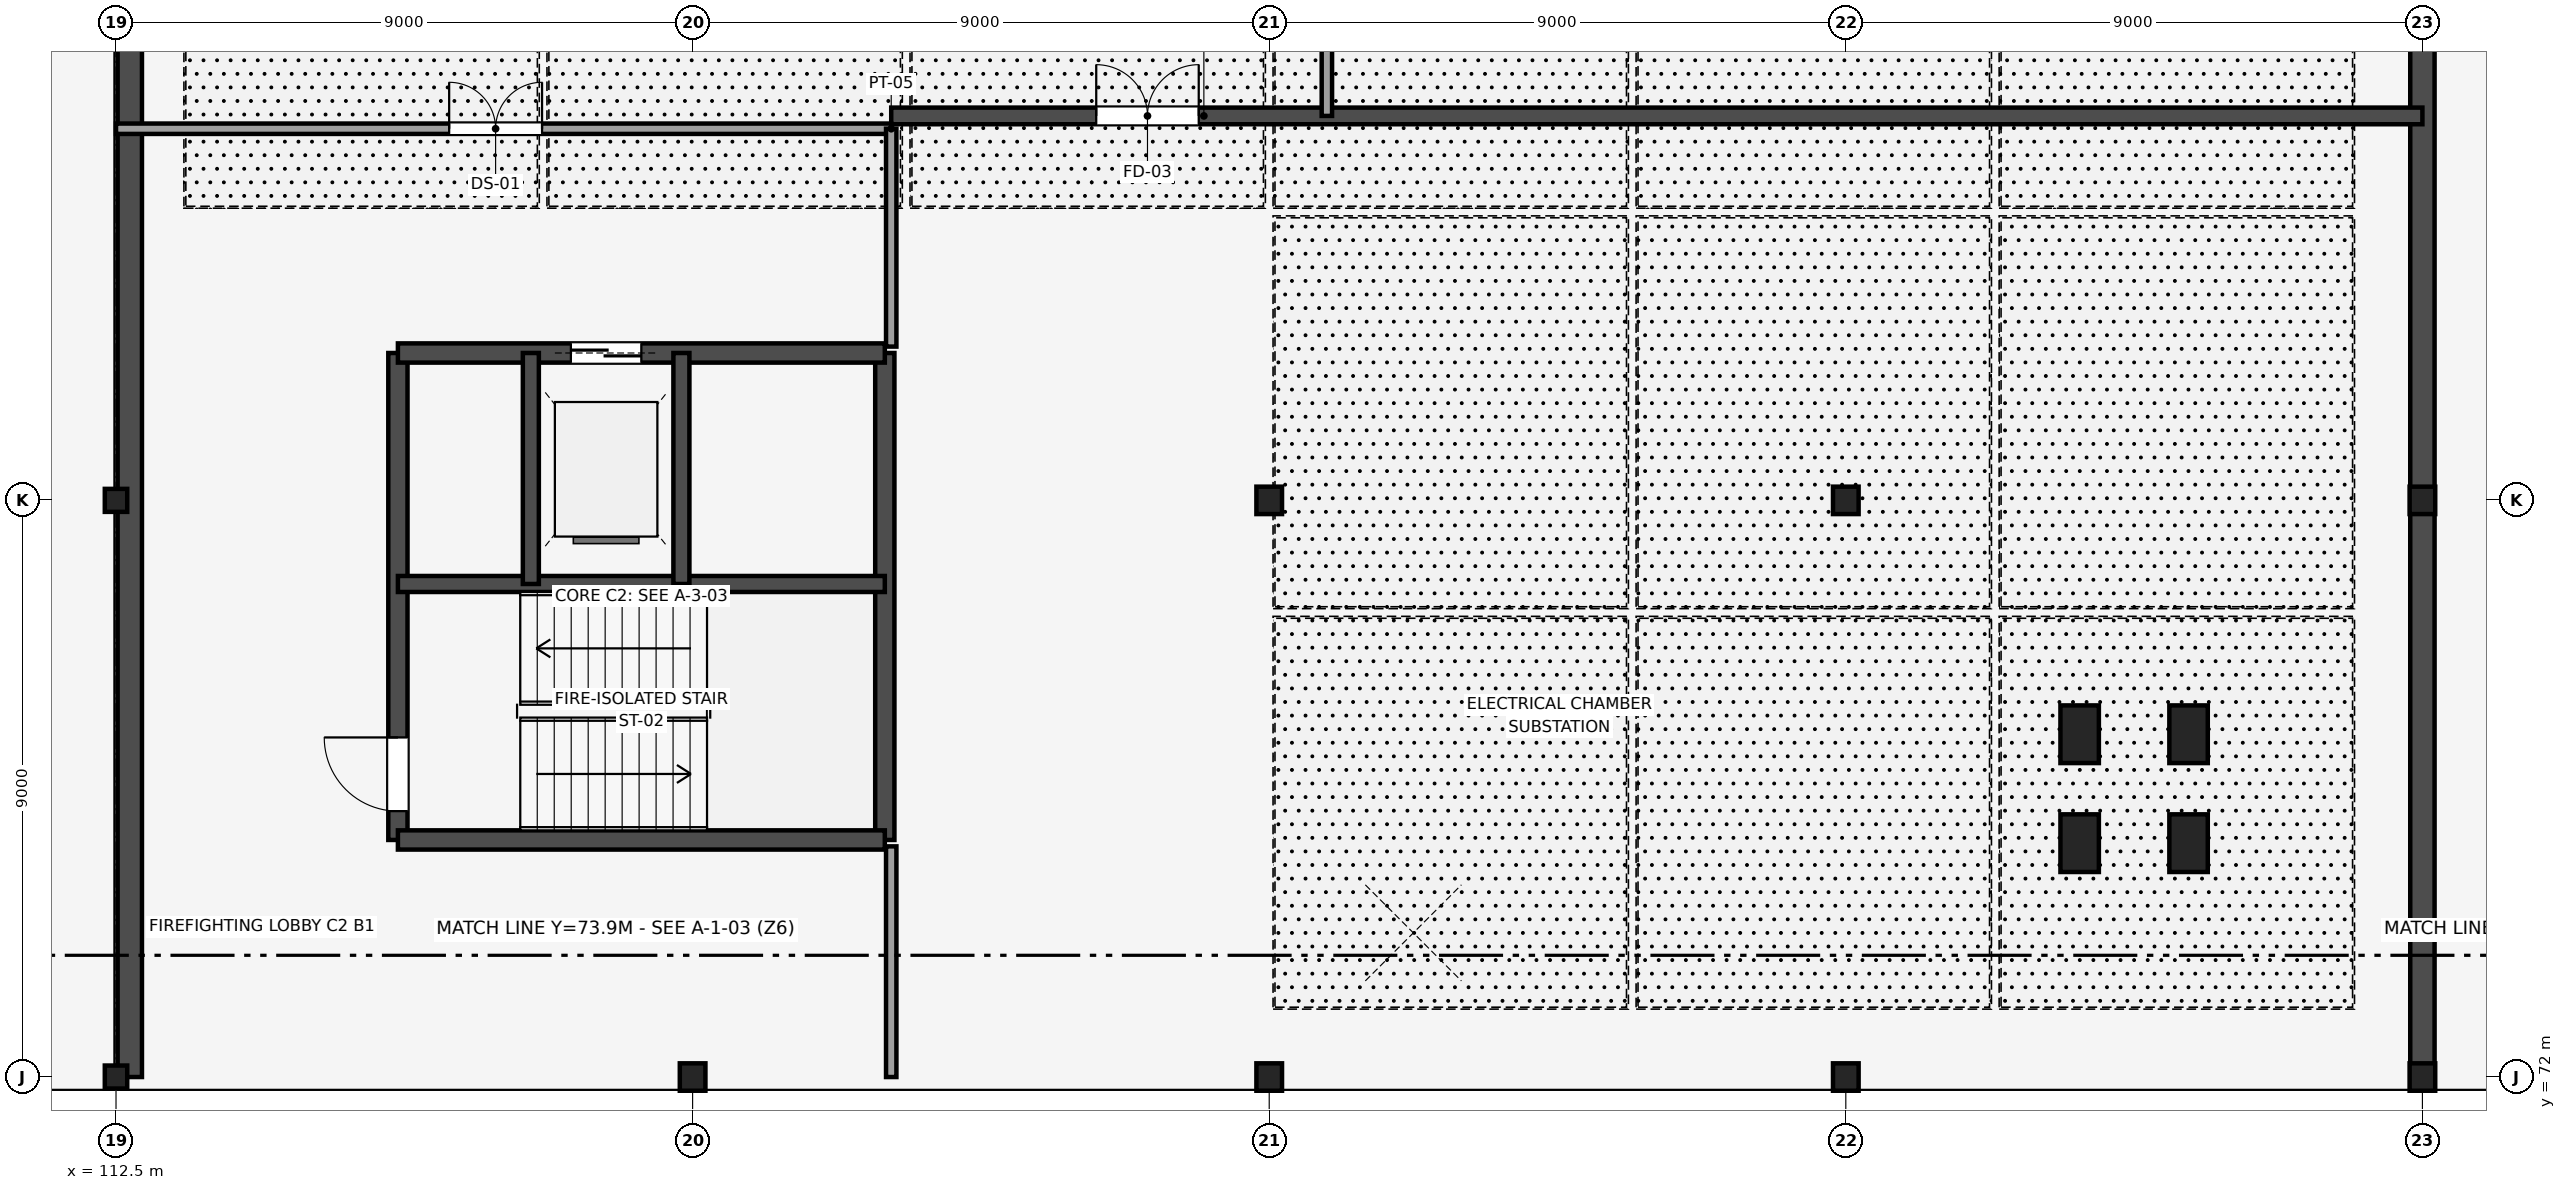
"""IFC4 building model, lengths in metres.
Left out: names, types, materials, properties, quantities, classifications, styles, units other than length and angle.
Written with IfcOpenShell. Run it as: python <this file> out.ifc"""

import sys

from ifc_helpers import new_model, si_unit, direction, frame, frame_2d, origin, origin_2d, place, context, subcontext, project, spatial, rectangle, i_section, extrude, element, fill, save


model = new_model("IFC4")
c1 = context("Model", 3, precision=1e-05, world=origin(), true_north=direction((0.0, 1.0)))
c2 = subcontext(c1, "Body", "Model", "MODEL_VIEW")
j1 = project(units=[si_unit("LENGTHUNIT", "METRE"), si_unit("PLANEANGLEUNIT", "RADIAN")], contexts=[c1])
p1 = place(None, origin())
s1 = spatial("IfcSite", under=j1, at=p1, CompositionType="ELEMENT")
p2 = place(p1, origin())
s2 = spatial("IfcBuilding", under=s1, at=p2, CompositionType="ELEMENT")
p3 = place(p2, frame((0.0, 0.0, -4.5)))
s3 = spatial("IfcBuildingStorey", under=s2, at=p3, CompositionType="ELEMENT", Elevation=-4.5)
for number, where, z_axis, x_axis in (
    (1, (143.15, 75.65, 0.0), (0.0, 0.0, 1.0), (1.0, 0.0, 0.0)),
    (2, (144.85, 75.65, 0.0), (0.0, 0.0, 1.0), (1.0, 0.0, 0.0)),
    (3, (143.15, 77.35, 0.0), (0.0, 0.0, 1.0), (1.0, 0.0, 0.0)),
    (4, (144.85, 77.35, 0.0), (0.0, 0.0, 1.0), (1.0, 0.0, 0.0)),
):
    element("IfcColumn", number, at=place(p3, frame(where, z_axis=z_axis, x_axis=x_axis)), inside=s3, PredefinedType="COLUMN", context=c2, shape_type="SweptSolid", body=[
        extrude(rectangle(XDim=0.6, YDim=0.9, at=origin_2d()), origin(), (0.0, 0.0, 1.0), 4.26),
    ])
for number, where, z_axis, x_axis in (
    (5, (112.5, 72.0, 0.0), (0.0, 0.0, 1.0), (1.0, 0.0, 0.0)),
    (6, (112.5, 81.0, 0.0), (0.0, 0.0, 1.0), (1.0, 0.0, 0.0)),
):
    element("IfcColumn", number, at=place(p3, frame(where, z_axis=z_axis, x_axis=x_axis)), inside=s3, PredefinedType="COLUMN", context=c2, shape_type="SweptSolid", body=[
        extrude(i_section(OverallWidth=0.35, OverallDepth=0.359, WebThickness=0.016, FlangeThickness=0.024, FilletRadius=0.014, at=origin_2d()), origin(), (0.0, 0.0, 1.0), 4.5),
    ])
for number, where, z_axis, x_axis in (
    (7, (121.5, 72.0, 0.0), (0.0, 0.0, 1.0), (1.0, 0.0, 0.0)),
    (8, (130.5, 72.0, 0.0), (0.0, 0.0, 1.0), (1.0, 0.0, 0.0)),
    (9, (130.5, 81.0, 0.0), (0.0, 0.0, 1.0), (1.0, 0.0, 0.0)),
    (10, (139.5, 72.0, 0.0), (0.0, 0.0, 1.0), (1.0, 0.0, 0.0)),
    (11, (139.5, 81.0, 0.0), (0.0, 0.0, 1.0), (1.0, 0.0, 0.0)),
    (12, (148.5, 72.0, 0.0), (0.0, 0.0, 1.0), (1.0, 0.0, 0.0)),
    (13, (148.5, 81.0, 0.0), (0.0, 0.0, 1.0), (1.0, 0.0, 0.0)),
):
    element("IfcColumn", number, at=place(p3, frame(where, z_axis=z_axis, x_axis=x_axis)), inside=s3, PredefinedType="COLUMN", context=c2, shape_type="SweptSolid", body=[
        extrude(i_section(OverallWidth=0.4, OverallDepth=0.428, WebThickness=0.02, FlangeThickness=0.028, FilletRadius=0.016, at=origin_2d()), origin(), (0.0, 0.0, 1.0), 4.5),
    ])
p4 = place(p3, frame((116.9, 75.7, 0.0), z_axis=(0.0, 0.0, 1.0), x_axis=(0.0, 1.0, 0.0)))
e14 = element("IfcWall", 14, at=p4, inside=s3, PredefinedType="SHEAR", context=c2, shape_type="SweptSolid", body=[
    extrude(rectangle(XDim=7.6, YDim=0.3, at=frame_2d((3.8, 0.0))), origin(), (0.0, 0.0, 1.0), 4.5),
])
p5 = place(p4, frame((0.45, 0.0, 0.0)))
e15 = element("IfcOpeningElement", 15, at=p5, cuts=e14, PredefinedType="OPENING", context=c2, shape_type="SweptSolid", body=[
    extrude(rectangle(XDim=1.15, YDim=2.15, at=frame_2d((0.575, 1.075))), frame((0.0, 0.16, 0.0), z_axis=(0.0, -1.0, 0.0), x_axis=(1.0, 0.0, 0.0)), (0.0, 0.0, 1.0), 0.32),
])
for number, where, z_axis, x_axis in (
    (16, (124.5, 75.7, 0.0), (0.0, 0.0, 1.0), (0.0, 1.0, 0.0)),
    (17, (116.9, 75.7, 0.0), (0.0, 0.0, 1.0), (1.0, 0.0, 0.0)),
):
    element("IfcWall", number, at=place(p3, frame(where, z_axis=z_axis, x_axis=x_axis)), inside=s3, PredefinedType="SHEAR", context=c2, shape_type="SweptSolid", body=[
        extrude(rectangle(XDim=7.6, YDim=0.3, at=frame_2d((3.8, 0.0))), origin(), (0.0, 0.0, 1.0), 4.5),
    ])
p6 = place(p3, frame((116.9, 83.3, 0.0), z_axis=(0.0, 0.0, 1.0), x_axis=(1.0, 0.0, 0.0)))
e18 = element("IfcWall", 18, at=p6, inside=s3, PredefinedType="SHEAR", context=c2, shape_type="SweptSolid", body=[
    extrude(rectangle(XDim=7.6, YDim=0.3, at=frame_2d((3.8, 0.0))), origin(), (0.0, 0.0, 1.0), 4.5),
])
p7 = place(p6, frame((2.7, 0.0, 0.0)))
e19 = element("IfcOpeningElement", 19, at=p7, cuts=e18, PredefinedType="OPENING", context=c2, shape_type="SweptSolid", body=[
    extrude(rectangle(XDim=1.1, YDim=2.2, at=frame_2d((0.55, 1.1))), frame((0.0, 0.16, 0.0), z_axis=(0.0, -1.0, 0.0), x_axis=(1.0, 0.0, 0.0)), (0.0, 0.0, 1.0), 0.32),
])
p8 = place(p3, frame((116.9, 79.695, 0.0), z_axis=(0.0, 0.0, 1.0), x_axis=(1.0, 0.0, 0.0)))
e20 = element("IfcWall", 20, at=p8, inside=s3, PredefinedType="SHEAR", context=c2, shape_type="SweptSolid", body=[
    extrude(rectangle(XDim=7.6, YDim=0.25, at=frame_2d((3.8, 0.0))), origin(), (0.0, 0.0, 1.0), 4.5),
])
for number, where, z_axis, x_axis in (
    (21, (118.975, 79.695, 0.0), (0.0, 0.0, 1.0), (0.0, 1.0, 0.0)),
    (22, (121.325, 79.695, 0.0), (0.0, 0.0, 1.0), (0.0, 1.0, 0.0)),
):
    element("IfcWall", number, at=place(p3, frame(where, z_axis=z_axis, x_axis=x_axis)), inside=s3, PredefinedType="SHEAR", context=c2, shape_type="SweptSolid", body=[
        extrude(rectangle(XDim=3.605, YDim=0.25, at=frame_2d((1.802, 0.0))), origin(), (0.0, 0.0, 1.0), 4.5),
    ])
p9 = place(p3, frame((103.5, 72.0, 0.0), z_axis=(0.0, 0.0, 1.0), x_axis=(1.0, 0.0, 0.0)))
e23 = element("IfcWall", 23, at=p9, inside=s3, PredefinedType="SHEAR", context=c2, shape_type="SweptSolid", body=[
    extrude(rectangle(XDim=9.0, YDim=0.38, at=frame_2d((4.5, 0.0))), origin(), (0.0, 0.0, 1.0), 4.26),
])
p10 = place(p3, frame((148.5, 72.0, 0.0), z_axis=(0.0, 0.0, 1.0), x_axis=(1.0, 0.0, 0.0)))
e24 = element("IfcWall", 24, at=p10, inside=s3, PredefinedType="SHEAR", context=c2, shape_type="SweptSolid", body=[
    extrude(rectangle(XDim=13.5, YDim=0.38, at=frame_2d((6.75, 0.0))), origin(), (0.0, 0.0, 1.0), 4.26),
])
p11 = place(p3, frame((112.525, 72.0, 0.0), z_axis=(0.0, 0.0, 1.0), x_axis=(1.0, 0.0, 0.0)))
e25 = element("IfcWall", 25, at=p11, inside=s3, PredefinedType="SHEAR", context=c2, shape_type="SweptSolid", body=[
    extrude(rectangle(XDim=35.975, YDim=0.38, at=frame_2d((17.988, 0.0))), origin(), (0.0, 0.0, 1.0), 4.26),
])
for number, where, z_axis, x_axis in (
    (26, (112.715, 72.0, 0.0), (0.0, 0.0, 1.0), (0.0, 1.0, 0.0)),
    (27, (148.5, 72.0, 0.0), (0.0, 0.0, 1.0), (0.0, 1.0, 0.0)),
):
    element("IfcWall", number, at=place(p3, frame(where, z_axis=z_axis, x_axis=x_axis)), inside=s3, PredefinedType="SHEAR", context=c2, shape_type="SweptSolid", body=[
        extrude(rectangle(XDim=39.6, YDim=0.38, at=frame_2d((19.8, 0.0))), origin(), (0.0, 0.0, 1.0), 4.26),
    ])
p12 = place(p3, frame((124.6, 87.0, 0.0), z_axis=(0.0, 0.0, 1.0), x_axis=(1.0, 0.0, 0.0)))
e28 = element("IfcWall", 28, at=p12, inside=s3, PredefinedType="SHEAR", context=c2, shape_type="SweptSolid", body=[
    extrude(rectangle(XDim=23.9, YDim=0.26, at=frame_2d((11.95, 0.0))), origin(), (0.0, 0.0, 1.0), 4.26),
])
p13 = place(p12, frame((3.2, 0.0, 0.0)))
e29 = element("IfcOpeningElement", 29, at=p13, cuts=e28, PredefinedType="OPENING", context=c2, shape_type="SweptSolid", body=[
    extrude(rectangle(XDim=1.6, YDim=2.2, at=frame_2d((0.8, 1.1))), frame((0.0, 0.14, 0.0), z_axis=(0.0, -1.0, 0.0), x_axis=(1.0, 0.0, 0.0)), (0.0, 0.0, 1.0), 0.28),
])
p14 = place(p3, frame((112.5, 86.8, 0.0), z_axis=(0.0, 0.0, 1.0), x_axis=(1.0, 0.0, 0.0)))
e30 = element("IfcWall", 30, at=p14, inside=s3, PredefinedType="PARTITIONING", context=c2, shape_type="SweptSolid", body=[
    extrude(rectangle(XDim=12.1, YDim=0.162, at=frame_2d((6.05, 0.0))), origin(), (0.0, 0.0, 1.0), 4.26),
])
p15 = place(p14, frame((5.2, 0.0, 0.0)))
e31 = element("IfcOpeningElement", 31, at=p15, cuts=e30, PredefinedType="OPENING", context=c2, shape_type="SweptSolid", body=[
    extrude(rectangle(XDim=1.45, YDim=2.15, at=frame_2d((0.725, 1.075))), frame((0.0, 0.091, 0.0), z_axis=(0.0, -1.0, 0.0), x_axis=(1.0, 0.0, 0.0)), (0.0, 0.0, 1.0), 0.182),
])
p16 = place(p3, frame((124.6, 83.4, 0.0), z_axis=(0.0, 0.0, 1.0), x_axis=(0.0, 1.0, 0.0)))
e32 = element("IfcWall", 32, at=p16, inside=s3, PredefinedType="PARTITIONING", context=c2, shape_type="SweptSolid", body=[
    extrude(rectangle(XDim=3.4, YDim=0.162, at=frame_2d((1.7, 0.0))), origin(), (0.0, 0.0, 1.0), 4.26),
])
p17 = place(p3, frame((124.6, 72.0, 0.0), z_axis=(0.0, 0.0, 1.0), x_axis=(0.0, 1.0, 0.0)))
e33 = element("IfcWall", 33, at=p17, inside=s3, PredefinedType="PARTITIONING", context=c2, shape_type="SweptSolid", body=[
    extrude(rectangle(XDim=3.6, YDim=0.162, at=frame_2d((1.8, 0.0))), origin(), (0.0, 0.0, 1.0), 4.26),
])
p18 = place(p3, frame((131.4, 87.0, 0.0), z_axis=(0.0, 0.0, 1.0), x_axis=(0.0, 1.0, 0.0)))
e34 = element("IfcWall", 34, at=p18, inside=s3, PredefinedType="PARTITIONING", context=c2, shape_type="SweptSolid", body=[
    extrude(rectangle(XDim=9.6, YDim=0.162, at=frame_2d((4.8, 0.0))), origin(), (0.0, 0.0, 1.0), 4.26),
])
p19 = place(p18, frame((4.0, 0.0, 0.0)))
e35 = element("IfcOpeningElement", 35, at=p19, cuts=e34, PredefinedType="OPENING", context=c2, shape_type="SweptSolid", body=[
    extrude(rectangle(XDim=1.62, YDim=2.25, at=frame_2d((0.81, 1.125))), frame((0.0, 0.091, 0.0), z_axis=(0.0, -1.0, 0.0), x_axis=(1.0, 0.0, 0.0)), (0.0, 0.0, 1.0), 0.182),
])
p20 = place(p5, origin())
e36 = element("IfcDoor", 36, at=p20, inside=s3, OperationType="SINGLE_SWING_RIGHT", PredefinedType="DOOR", context=c2, shape_type="SweptSolid", body=[
    extrude(rectangle(XDim=1.15, YDim=2.15, at=frame_2d((0.575, 1.075))), frame((0.0, 0.025, 0.0), z_axis=(0.0, -1.0, 0.0), x_axis=(1.0, 0.0, 0.0)), (0.0, 0.0, 1.0), 0.05),
])
fill(e15, e36)
p21 = place(p7, origin())
e37 = element("IfcDoor", 37, at=p21, inside=s3, OperationType="DOUBLE_DOOR_SLIDING", PredefinedType="DOOR", context=c2, shape_type="SweptSolid", body=[
    extrude(rectangle(XDim=1.1, YDim=2.2, at=frame_2d((0.55, 1.1))), frame((0.0, 0.025, 0.0), z_axis=(0.0, -1.0, 0.0), x_axis=(1.0, 0.0, 0.0)), (0.0, 0.0, 1.0), 0.05),
])
fill(e19, e37)
p22 = place(p13, origin())
e38 = element("IfcDoor", 38, at=p22, inside=s3, OperationType="DOUBLE_DOOR_SINGLE_SWING", PredefinedType="DOOR", context=c2, shape_type="SweptSolid", body=[
    extrude(rectangle(XDim=1.6, YDim=2.2, at=frame_2d((0.8, 1.1))), frame((0.0, 0.025, 0.0), z_axis=(0.0, -1.0, 0.0), x_axis=(1.0, 0.0, 0.0)), (0.0, 0.0, 1.0), 0.05),
])
fill(e29, e38)
p23 = place(p15, origin())
e39 = element("IfcDoor", 39, at=p23, inside=s3, OperationType="DOUBLE_DOOR_SINGLE_SWING", PredefinedType="DOOR", context=c2, shape_type="SweptSolid", body=[
    extrude(rectangle(XDim=1.45, YDim=2.15, at=frame_2d((0.725, 1.075))), frame((0.0, 0.025, 0.0), z_axis=(0.0, -1.0, 0.0), x_axis=(1.0, 0.0, 0.0)), (0.0, 0.0, 1.0), 0.05),
])
fill(e31, e39)
save(model, sys.argv[1])
